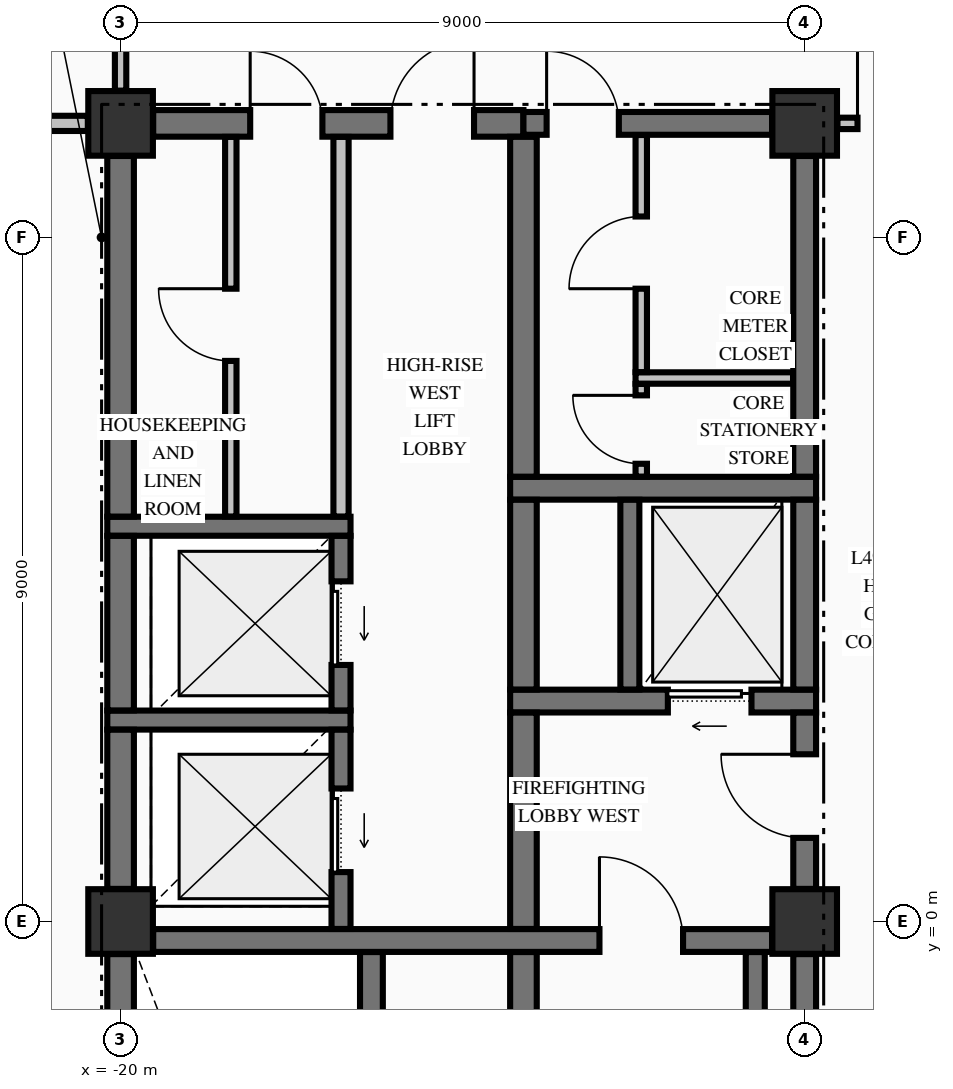
"""IFC4 building model, lengths in metres.
Left out: names, types, materials, properties, quantities, classifications, styles, units other than length and angle.
Written with IfcOpenShell. Run it as: python <this file> out.ifc"""

import sys

from ifc_helpers import new_model, si_unit, direction, frame, frame_2d, origin, origin_2d, place, context, subcontext, project, spatial, rectangle, extrude, element, fill, save


model = new_model("IFC4")
c1 = context("Model", 3, precision=1e-05, world=origin(), true_north=direction((0.0, 1.0)))
c2 = subcontext(c1, "Body", "Model", "MODEL_VIEW")
j1 = project(units=[si_unit("LENGTHUNIT", "METRE"), si_unit("PLANEANGLEUNIT", "RADIAN")], contexts=[c1])
p1 = place(None, origin())
s1 = spatial("IfcSite", under=j1, at=p1, CompositionType="ELEMENT")
p2 = place(p1, origin())
s2 = spatial("IfcBuilding", under=s1, at=p2, CompositionType="ELEMENT")
p3 = place(p2, frame((0.0, 0.0, 191.46)))
s3 = spatial("IfcBuildingStorey", under=s2, at=p3, CompositionType="ELEMENT", Elevation=191.46)
for number, where, z_axis, x_axis in (
    (1, (-20.0, 10.5, -0.425), (0.0, 0.0, 1.0), (1.0, 0.0, 0.0)),
    (2, (-11.0, 0.0, -0.425), (0.0, 0.0, 1.0), (1.0, 0.0, 0.0)),
    (3, (-11.0, 10.5, -0.425), (0.0, 0.0, 1.0), (1.0, 0.0, 0.0)),
    (4, (-20.0, 0.0, -0.425), (0.0, 0.0, 1.0), (1.0, 0.0, 0.0)),
):
    element("IfcColumn", number, at=place(p3, frame(where, z_axis=z_axis, x_axis=x_axis)), inside=s3, PredefinedType="COLUMN", context=c2, shape_type="SweptSolid", body=[
        extrude(rectangle(XDim=0.85, YDim=0.85, at=origin_2d()), origin(), (0.0, 0.0, 1.0), 3.55),
    ])
p4 = place(p3, frame((-19.571, -0.25, 0.0), z_axis=(0.0, 0.0, 1.0), x_axis=(1.0, 0.0, 0.0)))
e5 = element("IfcWall", 5, at=p4, inside=s3, PredefinedType="SHEAR", context=c2, shape_type="SweptSolid", body=[
    extrude(rectangle(XDim=8.142, YDim=0.3, at=frame_2d((4.071, 0.0))), origin(), (0.0, 0.0, 1.0), 3.125),
])
p5 = place(p4, frame((5.871, 0.0, 0.0)))
e6 = element("IfcOpeningElement", 6, at=p5, cuts=e5, PredefinedType="OPENING", context=c2, shape_type="SweptSolid", body=[
    extrude(rectangle(XDim=1.1, YDim=2.15, at=frame_2d((0.55, 1.075))), frame((0.0, 0.16, 0.0), z_axis=(0.0, -1.0, 0.0), x_axis=(1.0, 0.0, 0.0)), (0.0, 0.0, 1.0), 0.32),
])
p6 = place(p3, frame((-20.175, 2.65, 0.0), z_axis=(0.0, 0.0, 1.0), x_axis=(1.0, 0.0, 0.0)))
e7 = element("IfcWall", 7, at=p6, inside=s3, PredefinedType="SOLIDWALL", context=c2, shape_type="SweptSolid", body=[
    extrude(rectangle(XDim=3.2, YDim=0.25, at=frame_2d((1.6, 0.0))), origin(), (0.0, 0.0, 1.0), 3.125),
])
p7 = place(p3, frame((-14.875, 2.9, 0.0), z_axis=(0.0, 0.0, 1.0), x_axis=(1.0, 0.0, 0.0)))
e8 = element("IfcWall", 8, at=p7, inside=s3, PredefinedType="SHEAR", context=c2, shape_type="SweptSolid", body=[
    extrude(rectangle(XDim=4.025, YDim=0.3, at=frame_2d((2.012, 0.0))), origin(), (0.0, 0.0, 1.0), 3.125),
])
p8 = place(p7, frame((2.075, 0.0, 0.0)))
e9 = element("IfcOpeningElement", 9, at=p8, cuts=e8, PredefinedType="OPENING", context=c2, shape_type="SweptSolid", body=[
    extrude(rectangle(XDim=1.1, YDim=2.2, at=frame_2d((0.55, 1.1))), frame((0.0, 0.16, 0.0), z_axis=(0.0, -1.0, 0.0), x_axis=(1.0, 0.0, 0.0)), (0.0, 0.0, 1.0), 0.32),
])
p9 = place(p3, frame((-20.175, 5.2, 0.0), z_axis=(0.0, 0.0, 1.0), x_axis=(1.0, 0.0, 0.0)))
e10 = element("IfcWall", 10, at=p9, inside=s3, PredefinedType="SOLIDWALL", context=c2, shape_type="SweptSolid", body=[
    extrude(rectangle(XDim=3.2, YDim=0.25, at=frame_2d((1.6, 0.0))), origin(), (0.0, 0.0, 1.0), 3.125),
])
p10 = place(p3, frame((-14.875, 5.7, 0.0), z_axis=(0.0, 0.0, 1.0), x_axis=(1.0, 0.0, 0.0)))
e11 = element("IfcWall", 11, at=p10, inside=s3, PredefinedType="SHEAR", context=c2, shape_type="SweptSolid", body=[
    extrude(rectangle(XDim=4.025, YDim=0.3, at=frame_2d((2.012, 0.0))), origin(), (0.0, 0.0, 1.0), 3.125),
])
p11 = place(p3, frame((-19.571, 10.5, 0.0), z_axis=(0.0, 0.0, 1.0), x_axis=(1.0, 0.0, 0.0)))
e12 = element("IfcWall", 12, at=p11, inside=s3, PredefinedType="SHEAR", context=c2, shape_type="SweptSolid", body=[
    extrude(rectangle(XDim=4.871, YDim=0.35, at=frame_2d((2.436, 0.0))), origin(), (0.0, 0.0, 1.0), 3.125),
])
p12 = place(p11, frame((3.121, 0.0, 0.0)))
e13 = element("IfcOpeningElement", 13, at=p12, cuts=e12, PredefinedType="OPENING", context=c2, shape_type="SweptSolid", body=[
    extrude(rectangle(XDim=1.1, YDim=2.15, at=frame_2d((0.55, 1.075))), frame((0.0, 0.185, 0.0), z_axis=(0.0, -1.0, 0.0), x_axis=(1.0, 0.0, 0.0)), (0.0, 0.0, 1.0), 0.37),
])
p13 = place(p11, frame((1.276, 0.0, 0.0)))
e14 = element("IfcOpeningElement", 14, at=p13, cuts=e12, PredefinedType="OPENING", context=c2, shape_type="SweptSolid", body=[
    extrude(rectangle(XDim=0.95, YDim=2.15, at=frame_2d((0.475, 1.075))), frame((0.0, 0.185, 0.0), z_axis=(0.0, -1.0, 0.0), x_axis=(1.0, 0.0, 0.0)), (0.0, 0.0, 1.0), 0.37),
])
p14 = place(p3, frame((-14.7, 10.5, 0.0), z_axis=(0.0, 0.0, 1.0), x_axis=(1.0, 0.0, 0.0)))
e15 = element("IfcWall", 15, at=p14, inside=s3, PredefinedType="SHEAR", context=c2, shape_type="SweptSolid", body=[
    extrude(rectangle(XDim=3.271, YDim=0.3, at=frame_2d((1.635, 0.0))), origin(), (0.0, 0.0, 1.0), 3.125),
])
p15 = place(p14, frame((0.305, 0.0, 0.0)))
e16 = element("IfcOpeningElement", 16, at=p15, cuts=e15, PredefinedType="OPENING", context=c2, shape_type="SweptSolid", body=[
    extrude(rectangle(XDim=0.95, YDim=2.15, at=frame_2d((0.475, 1.075))), frame((0.0, 0.16, 0.0), z_axis=(0.0, -1.0, 0.0), x_axis=(1.0, 0.0, 0.0)), (0.0, 0.0, 1.0), 0.32),
])
p16 = place(p3, frame((-13.225, 7.15, 0.0), z_axis=(0.0, 0.0, 1.0), x_axis=(1.0, 0.0, 0.0)))
e17 = element("IfcWall", 17, at=p16, inside=s3, PredefinedType="PARTITIONING", context=c2, shape_type="SweptSolid", body=[
    extrude(rectangle(XDim=2.072, YDim=0.15, at=frame_2d((1.036, 0.0))), origin(), (0.0, 0.0, 1.0), 3.125),
])
p17 = place(p3, frame((-26.835, 10.5, 0.0), z_axis=(0.0, 0.0, 1.0), x_axis=(1.0, 0.0, 0.0)))
e18 = element("IfcWall", 18, at=p17, inside=s3, PredefinedType="PARTITIONING", context=c2, shape_type="SweptSolid", body=[
    extrude(rectangle(XDim=6.404, YDim=0.2, at=frame_2d((3.202, 0.0))), origin(), (0.0, 0.0, 1.0), 3.125),
])
p18 = place(p17, frame((2.86, 0.0, 0.0)))
e19 = element("IfcOpeningElement", 19, at=p18, cuts=e18, PredefinedType="OPENING", context=c2, shape_type="SweptSolid", body=[
    extrude(rectangle(XDim=0.95, YDim=2.15, at=frame_2d((0.475, 1.075))), frame((0.0, 0.11, 0.0), z_axis=(0.0, -1.0, 0.0), x_axis=(1.0, 0.0, 0.0)), (0.0, 0.0, 1.0), 0.22),
])
p19 = place(p3, frame((-10.569, 10.5, 0.0), z_axis=(0.0, 0.0, 1.0), x_axis=(1.0, 0.0, 0.0)))
e20 = element("IfcWall", 20, at=p19, inside=s3, PredefinedType="PARTITIONING", context=c2, shape_type="SweptSolid", body=[
    extrude(rectangle(XDim=21.138, YDim=0.15, at=frame_2d((10.569, 0.0))), origin(), (0.0, 0.0, 1.0), 3.125),
])
p20 = place(p19, frame((0.264, 0.0, 0.0)))
e21 = element("IfcOpeningElement", 21, at=p20, cuts=e20, PredefinedType="OPENING", context=c2, shape_type="SweptSolid", body=[
    extrude(rectangle(XDim=1.05, YDim=2.15, at=frame_2d((0.525, 1.075))), frame((0.0, 0.085, 0.0), z_axis=(0.0, -1.0, 0.0), x_axis=(1.0, 0.0, 0.0)), (0.0, 0.0, 1.0), 0.17),
])
p21 = place(p19, frame((19.824, 0.0, 0.0)))
e22 = element("IfcOpeningElement", 22, at=p21, cuts=e20, PredefinedType="OPENING", context=c2, shape_type="SweptSolid", body=[
    extrude(rectangle(XDim=1.05, YDim=2.15, at=frame_2d((0.525, 1.075))), frame((0.0, 0.085, 0.0), z_axis=(0.0, -1.0, 0.0), x_axis=(1.0, 0.0, 0.0)), (0.0, 0.0, 1.0), 0.17),
])
p22 = place(p3, frame((-20.0, -9.521, 0.0), z_axis=(0.0, 0.0, 1.0), x_axis=(0.0, 1.0, 0.0)))
e23 = element("IfcWall", 23, at=p22, inside=s3, PredefinedType="SHEAR", context=c2, shape_type="SweptSolid", body=[
    extrude(rectangle(XDim=9.092, YDim=0.35, at=frame_2d((4.546, 0.0))), origin(), (0.0, 0.0, 1.0), 3.125),
])
p23 = place(p3, frame((-20.0, 0.429, 0.0), z_axis=(0.0, 0.0, 1.0), x_axis=(0.0, 1.0, 0.0)))
e24 = element("IfcWall", 24, at=p23, inside=s3, PredefinedType="SHEAR", context=c2, shape_type="SweptSolid", body=[
    extrude(rectangle(XDim=2.094, YDim=0.35, at=frame_2d((1.047, 0.0))), origin(), (0.0, 0.0, 1.0), 3.125),
])
p24 = place(p3, frame((-20.0, 2.777, 0.0), z_axis=(0.0, 0.0, 1.0), x_axis=(0.0, 1.0, 0.0)))
e25 = element("IfcWall", 25, at=p24, inside=s3, PredefinedType="SHEAR", context=c2, shape_type="SweptSolid", body=[
    extrude(rectangle(XDim=2.296, YDim=0.35, at=frame_2d((1.148, 0.0))), origin(), (0.0, 0.0, 1.0), 3.125),
])
p25 = place(p3, frame((-20.0, 5.327, 0.0), z_axis=(0.0, 0.0, 1.0), x_axis=(0.0, 1.0, 0.0)))
e26 = element("IfcWall", 26, at=p25, inside=s3, PredefinedType="SHEAR", context=c2, shape_type="SweptSolid", body=[
    extrude(rectangle(XDim=4.744, YDim=0.35, at=frame_2d((2.372, 0.0))), origin(), (0.0, 0.0, 1.0), 3.125),
])
p26 = place(p3, frame((-17.1, -0.098, 0.0), z_axis=(0.0, 0.0, 1.0), x_axis=(0.0, 1.0, 0.0)))
e27 = element("IfcWall", 27, at=p26, inside=s3, PredefinedType="SOLIDWALL", context=c2, shape_type="SweptSolid", body=[
    extrude(rectangle(XDim=2.621, YDim=0.25, at=frame_2d((1.311, 0.0))), origin(), (0.0, 0.0, 1.0), 3.125),
])
p27 = place(p26, frame((0.748, 0.0, 0.0)))
e28 = element("IfcOpeningElement", 28, at=p27, cuts=e27, PredefinedType="OPENING", context=c2, shape_type="SweptSolid", body=[
    extrude(rectangle(XDim=1.1, YDim=2.2, at=frame_2d((0.55, 1.1))), frame((0.0, 0.135, 0.0), z_axis=(0.0, -1.0, 0.0), x_axis=(1.0, 0.0, 0.0)), (0.0, 0.0, 1.0), 0.27),
])
p28 = place(p3, frame((-17.1, 2.777, 0.0), z_axis=(0.0, 0.0, 1.0), x_axis=(0.0, 1.0, 0.0)))
e29 = element("IfcWall", 29, at=p28, inside=s3, PredefinedType="SOLIDWALL", context=c2, shape_type="SweptSolid", body=[
    extrude(rectangle(XDim=2.296, YDim=0.25, at=frame_2d((1.148, 0.0))), origin(), (0.0, 0.0, 1.0), 3.125),
])
p29 = place(p28, frame((0.598, 0.0, 0.0)))
e30 = element("IfcOpeningElement", 30, at=p29, cuts=e29, PredefinedType="OPENING", context=c2, shape_type="SweptSolid", body=[
    extrude(rectangle(XDim=1.1, YDim=2.2, at=frame_2d((0.55, 1.1))), frame((0.0, 0.135, 0.0), z_axis=(0.0, -1.0, 0.0), x_axis=(1.0, 0.0, 0.0)), (0.0, 0.0, 1.0), 0.27),
])
p30 = place(p3, frame((-16.7, -9.773, 0.0), z_axis=(0.0, 0.0, 1.0), x_axis=(0.0, 1.0, 0.0)))
e31 = element("IfcWall", 31, at=p30, inside=s3, PredefinedType="SHEAR", context=c2, shape_type="SweptSolid", body=[
    extrude(rectangle(XDim=9.371, YDim=0.3, at=frame_2d((4.686, 0.0))), origin(), (0.0, 0.0, 1.0), 3.125),
])
p31 = place(p3, frame((-14.7, -9.773, 0.0), z_axis=(0.0, 0.0, 1.0), x_axis=(0.0, 1.0, 0.0)))
e32 = element("IfcWall", 32, at=p31, inside=s3, PredefinedType="SHEAR", context=c2, shape_type="SweptSolid", body=[
    extrude(rectangle(XDim=9.371, YDim=0.35, at=frame_2d((4.686, 0.0))), origin(), (0.0, 0.0, 1.0), 3.125),
])
p32 = place(p3, frame((-14.7, -0.098, 0.0), z_axis=(0.0, 0.0, 1.0), x_axis=(0.0, 1.0, 0.0)))
e33 = element("IfcWall", 33, at=p32, inside=s3, PredefinedType="SHEAR", context=c2, shape_type="SweptSolid", body=[
    extrude(rectangle(XDim=2.846, YDim=0.35, at=frame_2d((1.423, 0.0))), origin(), (0.0, 0.0, 1.0), 3.125),
])
p33 = place(p3, frame((-14.7, 3.052, 0.0), z_axis=(0.0, 0.0, 1.0), x_axis=(0.0, 1.0, 0.0)))
e34 = element("IfcWall", 34, at=p33, inside=s3, PredefinedType="SHEAR", context=c2, shape_type="SweptSolid", body=[
    extrude(rectangle(XDim=2.496, YDim=0.35, at=frame_2d((1.248, 0.0))), origin(), (0.0, 0.0, 1.0), 3.125),
])
p34 = place(p3, frame((-14.7, 5.852, 0.0), z_axis=(0.0, 0.0, 1.0), x_axis=(0.0, 1.0, 0.0)))
e35 = element("IfcWall", 35, at=p34, inside=s3, PredefinedType="SHEAR", context=c2, shape_type="SweptSolid", body=[
    extrude(rectangle(XDim=4.471, YDim=0.35, at=frame_2d((2.235, 0.0))), origin(), (0.0, 0.0, 1.0), 3.125),
])
p35 = place(p3, frame((-13.3, 3.052, 0.0), z_axis=(0.0, 0.0, 1.0), x_axis=(0.0, 1.0, 0.0)))
e36 = element("IfcWall", 36, at=p35, inside=s3, PredefinedType="SOLIDWALL", context=c2, shape_type="SweptSolid", body=[
    extrude(rectangle(XDim=2.496, YDim=0.25, at=frame_2d((1.248, 0.0))), origin(), (0.0, 0.0, 1.0), 3.125),
])
p36 = place(p3, frame((-11.65, -9.798, 0.0), z_axis=(0.0, 0.0, 1.0), x_axis=(0.0, 1.0, 0.0)))
e37 = element("IfcWall", 37, at=p36, inside=s3, PredefinedType="SOLIDWALL", context=c2, shape_type="SweptSolid", body=[
    extrude(rectangle(XDim=9.396, YDim=0.25, at=frame_2d((4.698, 0.0))), origin(), (0.0, 0.0, 1.0), 3.125),
])
p37 = place(p3, frame((-11.0, -9.521, 0.0), z_axis=(0.0, 0.0, 1.0), x_axis=(0.0, 1.0, 0.0)))
e38 = element("IfcWall", 38, at=p37, inside=s3, PredefinedType="SHEAR", context=c2, shape_type="SweptSolid", body=[
    extrude(rectangle(XDim=9.092, YDim=0.3, at=frame_2d((4.546, 0.0))), origin(), (0.0, 0.0, 1.0), 3.125),
])
p38 = place(p3, frame((-11.0, 0.429, 0.0), z_axis=(0.0, 0.0, 1.0), x_axis=(0.0, 1.0, 0.0)))
e39 = element("IfcWall", 39, at=p38, inside=s3, PredefinedType="SHEAR", context=c2, shape_type="SweptSolid", body=[
    extrude(rectangle(XDim=2.319, YDim=0.3, at=frame_2d((1.16, 0.0))), origin(), (0.0, 0.0, 1.0), 3.125),
])
p39 = place(p38, frame((0.671, 0.0, 0.0)))
e40 = element("IfcOpeningElement", 40, at=p39, cuts=e39, PredefinedType="OPENING", context=c2, shape_type="SweptSolid", body=[
    extrude(rectangle(XDim=1.1, YDim=2.15, at=frame_2d((0.55, 1.075))), frame((0.0, 0.16, 0.0), z_axis=(0.0, -1.0, 0.0), x_axis=(1.0, 0.0, 0.0)), (0.0, 0.0, 1.0), 0.32),
])
p40 = place(p3, frame((-11.0, 3.052, 0.0), z_axis=(0.0, 0.0, 1.0), x_axis=(0.0, 1.0, 0.0)))
e41 = element("IfcWall", 41, at=p40, inside=s3, PredefinedType="SHEAR", context=c2, shape_type="SweptSolid", body=[
    extrude(rectangle(XDim=2.496, YDim=0.3, at=frame_2d((1.248, 0.0))), origin(), (0.0, 0.0, 1.0), 3.125),
])
p41 = place(p3, frame((-11.0, 5.852, 0.0), z_axis=(0.0, 0.0, 1.0), x_axis=(0.0, 1.0, 0.0)))
e42 = element("IfcWall", 42, at=p41, inside=s3, PredefinedType="SHEAR", context=c2, shape_type="SweptSolid", body=[
    extrude(rectangle(XDim=4.219, YDim=0.3, at=frame_2d((2.109, 0.0))), origin(), (0.0, 0.0, 1.0), 3.125),
])
p42 = place(p3, frame((-20.0, 10.931, 0.0), z_axis=(0.0, 0.0, 1.0), x_axis=(0.0, 1.0, 0.0)))
e43 = element("IfcWall", 43, at=p42, inside=s3, PredefinedType="PARTITIONING", context=c2, shape_type="SweptSolid", body=[
    extrude(rectangle(XDim=2.766, YDim=0.15, at=frame_2d((1.383, 0.0))), origin(), (0.0, 0.0, 1.0), 2.317),
])
p43 = place(p42, frame((0.744, 0.0, 0.0)))
e44 = element("IfcOpeningElement", 44, at=p43, cuts=e43, PredefinedType="OPENING", context=c2, shape_type="SweptSolid", body=[
    extrude(rectangle(XDim=0.95, YDim=2.15, at=frame_2d((0.475, 1.075))), frame((0.0, 0.085, 0.0), z_axis=(0.0, -1.0, 0.0), x_axis=(1.0, 0.0, 0.0)), (0.0, 0.0, 1.0), 0.17),
])
p44 = place(p3, frame((-18.55, 5.328, 0.0), z_axis=(0.0, 0.0, 1.0), x_axis=(0.0, 1.0, 0.0)))
e45 = element("IfcWall", 45, at=p44, inside=s3, PredefinedType="PARTITIONING", context=c2, shape_type="SweptSolid", body=[
    extrude(rectangle(XDim=4.994, YDim=0.15, at=frame_2d((2.497, 0.0))), origin(), (0.0, 0.0, 1.0), 3.125),
])
p45 = place(p44, frame((2.047, 0.0, 0.0)))
e46 = element("IfcOpeningElement", 46, at=p45, cuts=e45, PredefinedType="OPENING", context=c2, shape_type="SweptSolid", body=[
    extrude(rectangle(XDim=0.95, YDim=2.15, at=frame_2d((0.475, 1.075))), frame((0.0, 0.085, 0.0), z_axis=(0.0, -1.0, 0.0), x_axis=(1.0, 0.0, 0.0)), (0.0, 0.0, 1.0), 0.17),
])
p46 = place(p3, frame((-17.1, 5.328, 0.0), z_axis=(0.0, 0.0, 1.0), x_axis=(0.0, 1.0, 0.0)))
e47 = element("IfcWall", 47, at=p46, inside=s3, PredefinedType="PARTITIONING", context=c2, shape_type="SweptSolid", body=[
    extrude(rectangle(XDim=4.994, YDim=0.2, at=frame_2d((2.497, 0.0))), origin(), (0.0, 0.0, 1.0), 3.125),
])
p47 = place(p3, frame((-13.15, 5.853, 0.0), z_axis=(0.0, 0.0, 1.0), x_axis=(0.0, 1.0, 0.0)))
e48 = element("IfcWall", 48, at=p47, inside=s3, PredefinedType="PARTITIONING", context=c2, shape_type="SweptSolid", body=[
    extrude(rectangle(XDim=1.219, YDim=0.15, at=frame_2d((0.609, 0.0))), origin(), (0.0, 0.0, 1.0), 3.125),
])
p48 = place(p47, frame((0.169, 0.0, 0.0)))
e49 = element("IfcOpeningElement", 49, at=p48, cuts=e48, PredefinedType="OPENING", context=c2, shape_type="SweptSolid", body=[
    extrude(rectangle(XDim=0.9, YDim=2.15, at=frame_2d((0.45, 1.075))), frame((0.0, 0.085, 0.0), z_axis=(0.0, -1.0, 0.0), x_axis=(1.0, 0.0, 0.0)), (0.0, 0.0, 1.0), 0.17),
])
p49 = place(p3, frame((-13.15, 7.228, 0.0), z_axis=(0.0, 0.0, 1.0), x_axis=(0.0, 1.0, 0.0)))
e50 = element("IfcWall", 50, at=p49, inside=s3, PredefinedType="PARTITIONING", context=c2, shape_type="SweptSolid", body=[
    extrude(rectangle(XDim=3.119, YDim=0.15, at=frame_2d((1.56, 0.0))), origin(), (0.0, 0.0, 1.0), 3.125),
])
p50 = place(p49, frame((1.097, 0.0, 0.0)))
e51 = element("IfcOpeningElement", 51, at=p50, cuts=e50, PredefinedType="OPENING", context=c2, shape_type="SweptSolid", body=[
    extrude(rectangle(XDim=0.95, YDim=2.15, at=frame_2d((0.475, 1.075))), frame((0.0, 0.085, 0.0), z_axis=(0.0, -1.0, 0.0), x_axis=(1.0, 0.0, 0.0)), (0.0, 0.0, 1.0), 0.17),
])
p51 = place(p5, origin())
e52 = element("IfcDoor", 52, at=p51, inside=s3, OperationType="SINGLE_SWING_LEFT", PredefinedType="DOOR", context=c2, shape_type="SweptSolid", body=[
    extrude(rectangle(XDim=1.1, YDim=2.15, at=frame_2d((0.55, 1.075))), frame((0.0, 0.025, 0.0), z_axis=(0.0, -1.0, 0.0), x_axis=(1.0, 0.0, 0.0)), (0.0, 0.0, 1.0), 0.05),
])
fill(e6, e52)
p52 = place(p39, origin())
e53 = element("IfcDoor", 53, at=p52, inside=s3, OperationType="SINGLE_SWING_RIGHT", PredefinedType="DOOR", context=c2, shape_type="SweptSolid", body=[
    extrude(rectangle(XDim=1.1, YDim=2.15, at=frame_2d((0.55, 1.075))), frame((0.0, 0.025, 0.0), z_axis=(0.0, -1.0, 0.0), x_axis=(1.0, 0.0, 0.0)), (0.0, 0.0, 1.0), 0.05),
])
fill(e40, e53)
p53 = place(p8, origin())
e54 = element("IfcDoor", 54, at=p53, inside=s3, OperationType="SLIDING_TO_LEFT", PredefinedType="DOOR", context=c2, shape_type="SweptSolid", body=[
    extrude(rectangle(XDim=1.1, YDim=2.2, at=frame_2d((0.55, 1.1))), frame((0.0, 0.025, 0.0), z_axis=(0.0, -1.0, 0.0), x_axis=(1.0, 0.0, 0.0)), (0.0, 0.0, 1.0), 0.05),
])
fill(e9, e54)
p54 = place(p15, origin())
e55 = element("IfcDoor", 55, at=p54, inside=s3, OperationType="SINGLE_SWING_LEFT", PredefinedType="DOOR", context=c2, shape_type="SweptSolid", body=[
    extrude(rectangle(XDim=0.95, YDim=2.15, at=frame_2d((0.475, 1.075))), frame((0.0, 0.025, 0.0), z_axis=(0.0, -1.0, 0.0), x_axis=(1.0, 0.0, 0.0)), (0.0, 0.0, 1.0), 0.05),
])
fill(e16, e55)
p55 = place(p48, origin())
e56 = element("IfcDoor", 56, at=p55, inside=s3, OperationType="SINGLE_SWING_RIGHT", PredefinedType="DOOR", context=c2, shape_type="SweptSolid", body=[
    extrude(rectangle(XDim=0.9, YDim=2.15, at=frame_2d((0.45, 1.075))), frame((0.0, 0.025, 0.0), z_axis=(0.0, -1.0, 0.0), x_axis=(1.0, 0.0, 0.0)), (0.0, 0.0, 1.0), 0.05),
])
fill(e49, e56)
p56 = place(p50, origin())
e57 = element("IfcDoor", 57, at=p56, inside=s3, OperationType="SINGLE_SWING_LEFT", PredefinedType="DOOR", context=c2, shape_type="SweptSolid", body=[
    extrude(rectangle(XDim=0.95, YDim=2.15, at=frame_2d((0.475, 1.075))), frame((0.0, 0.025, 0.0), z_axis=(0.0, -1.0, 0.0), x_axis=(1.0, 0.0, 0.0)), (0.0, 0.0, 1.0), 0.05),
])
fill(e51, e57)
p57 = place(p27, origin())
e58 = element("IfcDoor", 58, at=p57, inside=s3, OperationType="SLIDING_TO_LEFT", PredefinedType="DOOR", context=c2, shape_type="SweptSolid", body=[
    extrude(rectangle(XDim=1.1, YDim=2.2, at=frame_2d((0.55, 1.1))), frame((0.0, 0.025, 0.0), z_axis=(0.0, -1.0, 0.0), x_axis=(1.0, 0.0, 0.0)), (0.0, 0.0, 1.0), 0.05),
])
fill(e28, e58)
p58 = place(p29, origin())
e59 = element("IfcDoor", 59, at=p58, inside=s3, OperationType="SLIDING_TO_LEFT", PredefinedType="DOOR", context=c2, shape_type="SweptSolid", body=[
    extrude(rectangle(XDim=1.1, YDim=2.2, at=frame_2d((0.55, 1.1))), frame((0.0, 0.025, 0.0), z_axis=(0.0, -1.0, 0.0), x_axis=(1.0, 0.0, 0.0)), (0.0, 0.0, 1.0), 0.05),
])
fill(e30, e59)
p59 = place(p12, origin())
e60 = element("IfcDoor", 60, at=p59, inside=s3, OperationType="SINGLE_SWING_RIGHT", PredefinedType="DOOR", context=c2, shape_type="SweptSolid", body=[
    extrude(rectangle(XDim=1.1, YDim=2.15, at=frame_2d((0.55, 1.075))), frame((0.0, 0.025, 0.0), z_axis=(0.0, -1.0, 0.0), x_axis=(1.0, 0.0, 0.0)), (0.0, 0.0, 1.0), 0.05),
])
fill(e13, e60)
p60 = place(p13, origin())
e61 = element("IfcDoor", 61, at=p60, inside=s3, OperationType="SINGLE_SWING_LEFT", PredefinedType="DOOR", context=c2, shape_type="SweptSolid", body=[
    extrude(rectangle(XDim=0.95, YDim=2.15, at=frame_2d((0.475, 1.075))), frame((0.0, 0.025, 0.0), z_axis=(0.0, -1.0, 0.0), x_axis=(1.0, 0.0, 0.0)), (0.0, 0.0, 1.0), 0.05),
])
fill(e14, e61)
p61 = place(p45, origin())
e62 = element("IfcDoor", 62, at=p61, inside=s3, OperationType="SINGLE_SWING_RIGHT", PredefinedType="DOOR", context=c2, shape_type="SweptSolid", body=[
    extrude(rectangle(XDim=0.95, YDim=2.15, at=frame_2d((0.475, 1.075))), frame((0.0, 0.025, 0.0), z_axis=(0.0, -1.0, 0.0), x_axis=(1.0, 0.0, 0.0)), (0.0, 0.0, 1.0), 0.05),
])
fill(e46, e62)
p62 = place(p20, origin())
e63 = element("IfcDoor", 63, at=p62, inside=s3, OperationType="SINGLE_SWING_LEFT", PredefinedType="DOOR", context=c2, shape_type="SweptSolid", body=[
    extrude(rectangle(XDim=1.05, YDim=2.15, at=frame_2d((0.525, 1.075))), frame((0.0, 0.025, 0.0), z_axis=(0.0, -1.0, 0.0), x_axis=(1.0, 0.0, 0.0)), (0.0, 0.0, 1.0), 0.05),
])
fill(e21, e63)
save(model, sys.argv[1])
